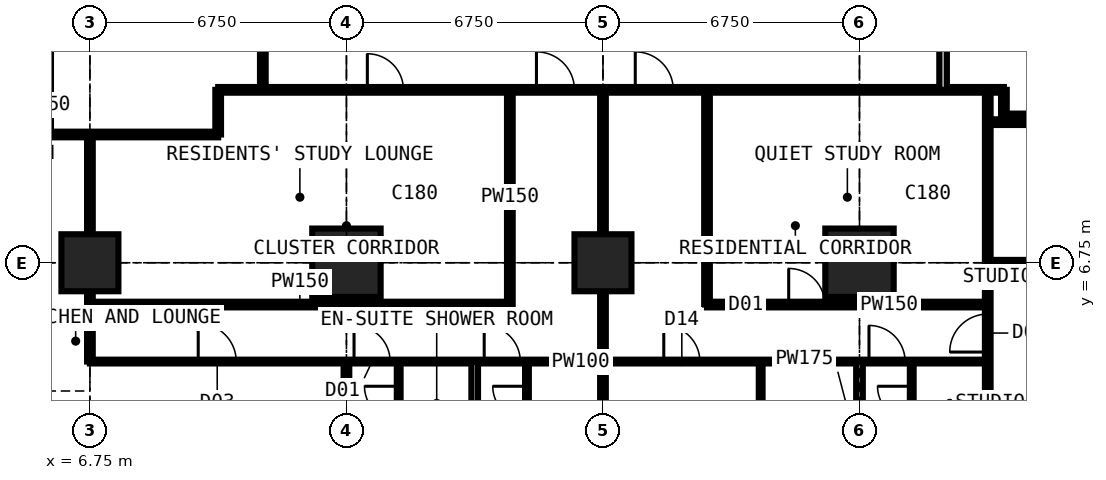
"""IFC4 building model, lengths in metres.
Left out: names, types, materials, properties, quantities, classifications, styles, units other than length and angle.
Written with IfcOpenShell. Run it as: python <this file> out.ifc"""

import sys

from ifc_helpers import new_model, si_unit, direction, frame, frame_2d, origin, origin_2d, place, context, subcontext, project, spatial, rectangle, extrude, element, fill, save


model = new_model("IFC4")
c1 = context("Model", 3, precision=1e-05, world=origin(), true_north=direction((0.0, 1.0)))
c2 = subcontext(c1, "Body", "Model", "MODEL_VIEW")
j1 = project(units=[si_unit("LENGTHUNIT", "METRE"), si_unit("PLANEANGLEUNIT", "RADIAN")], contexts=[c1])
p1 = place(None, origin())
s1 = spatial("IfcSite", under=j1, at=p1, CompositionType="ELEMENT")
p2 = place(p1, origin())
s2 = spatial("IfcBuilding", under=s1, at=p2, CompositionType="ELEMENT")
p3 = place(p2, frame((0.0, 0.0, 134.1)))
s3 = spatial("IfcBuildingStorey", under=s2, at=p3, CompositionType="ELEMENT", Elevation=134.1)
p4 = place(p3, frame((6.75, 6.75, 0.0), z_axis=(0.0, 0.0, 1.0), x_axis=(1.0, 0.0, 0.0)))
e1 = element("IfcColumn", 1, at=p4, inside=s3, PredefinedType="COLUMN", context=c2, shape_type="SweptSolid", body=[
    extrude(rectangle(XDim=1.5, YDim=1.5, at=origin_2d()), origin(), (0.0, 0.0, 1.0), 3.6),
])
p5 = place(p3, frame((13.5, 6.75, 0.0), z_axis=(0.0, 0.0, 1.0), x_axis=(1.0, 0.0, 0.0)))
e2 = element("IfcColumn", 2, at=p5, inside=s3, PredefinedType="COLUMN", context=c2, shape_type="SweptSolid", body=[
    extrude(rectangle(XDim=1.8, YDim=1.8, at=origin_2d()), origin(), (0.0, 0.0, 1.0), 3.6),
])
p6 = place(p3, frame((20.25, 6.75, 0.0), z_axis=(0.0, 0.0, 1.0), x_axis=(1.0, 0.0, 0.0)))
e3 = element("IfcColumn", 3, at=p6, inside=s3, PredefinedType="COLUMN", context=c2, shape_type="SweptSolid", body=[
    extrude(rectangle(XDim=1.5, YDim=1.5, at=origin_2d()), origin(), (0.0, 0.0, 1.0), 3.6),
])
p7 = place(p3, frame((27.0, 6.75, 0.0), z_axis=(0.0, 0.0, 1.0), x_axis=(1.0, 0.0, 0.0)))
e4 = element("IfcColumn", 4, at=p7, inside=s3, PredefinedType="COLUMN", context=c2, shape_type="SweptSolid", body=[
    extrude(rectangle(XDim=1.8, YDim=1.8, at=origin_2d()), origin(), (0.0, 0.0, 1.0), 3.6),
])
p8 = place(p3, frame((-0.734, 10.125, 0.0), z_axis=(0.0, 0.0, 1.0), x_axis=(1.0, 0.0, 0.0)))
e5 = element("IfcWall", 5, at=p8, inside=s3, PredefinedType="PARTITIONING", context=c2, shape_type="SweptSolid", body=[
    extrude(rectangle(XDim=10.859, YDim=0.15, at=frame_2d((5.429, 0.0))), origin(), (0.0, 0.0, 1.0), 3.3),
])
p9 = place(p3, frame((6.75, 4.15, 0.0), z_axis=(0.0, 0.0, 1.0), x_axis=(0.0, 1.0, 0.0)))
e6 = element("IfcWall", 6, at=p9, inside=s3, PredefinedType="PARTITIONING", context=c2, shape_type="SweptSolid", body=[
    extrude(rectangle(XDim=5.975, YDim=0.15, at=frame_2d((2.988, 0.0))), origin(), (0.0, 0.0, 1.0), 2.802),
])
p10 = place(p3, frame((6.75, 4.15, 0.0), z_axis=(0.0, 0.0, 1.0), x_axis=(1.0, 0.0, 0.0)))
e7 = element("IfcWall", 7, at=p10, inside=s3, PredefinedType="PARTITIONING", context=c2, shape_type="SweptSolid", body=[
    extrude(rectangle(XDim=23.625, YDim=0.1, at=frame_2d((11.812, 0.0))), origin(), (0.0, 0.0, 1.0), 3.3),
])
p11 = place(p10, frame((2.85, 0.0, 0.0)))
e8 = element("IfcOpeningElement", 8, at=p11, cuts=e7, PredefinedType="OPENING", context=c2, shape_type="SweptSolid", body=[
    extrude(rectangle(XDim=1.0, YDim=2.2, at=frame_2d((0.5, 1.1))), frame((0.0, 0.06, 0.0), z_axis=(0.0, -1.0, 0.0), x_axis=(1.0, 0.0, 0.0)), (0.0, 0.0, 1.0), 0.12),
])
p12 = place(p10, frame((6.95, 0.0, 0.0)))
e9 = element("IfcOpeningElement", 9, at=p12, cuts=e7, PredefinedType="OPENING", context=c2, shape_type="SweptSolid", body=[
    extrude(rectangle(XDim=0.95, YDim=2.2, at=frame_2d((0.475, 1.1))), frame((0.0, 0.06, 0.0), z_axis=(0.0, -1.0, 0.0), x_axis=(1.0, 0.0, 0.0)), (0.0, 0.0, 1.0), 0.12),
])
p13 = place(p10, frame((10.375, 0.0, 0.0)))
e10 = element("IfcOpeningElement", 10, at=p13, cuts=e7, PredefinedType="OPENING", context=c2, shape_type="SweptSolid", body=[
    extrude(rectangle(XDim=0.95, YDim=2.2, at=frame_2d((0.475, 1.1))), frame((0.0, 0.06, 0.0), z_axis=(0.0, -1.0, 0.0), x_axis=(1.0, 0.0, 0.0)), (0.0, 0.0, 1.0), 0.12),
])
p14 = place(p10, frame((15.1, 0.0, 0.0)))
e11 = element("IfcOpeningElement", 11, at=p14, cuts=e7, PredefinedType="OPENING", context=c2, shape_type="SweptSolid", body=[
    extrude(rectangle(XDim=0.95, YDim=2.2, at=frame_2d((0.475, 1.1))), frame((0.0, 0.06, 0.0), z_axis=(0.0, -1.0, 0.0), x_axis=(1.0, 0.0, 0.0)), (0.0, 0.0, 1.0), 0.12),
])
p15 = place(p10, frame((20.5, 0.0, 0.0)))
e12 = element("IfcOpeningElement", 12, at=p15, cuts=e7, PredefinedType="OPENING", context=c2, shape_type="SweptSolid", body=[
    extrude(rectangle(XDim=0.95, YDim=2.2, at=frame_2d((0.475, 1.1))), frame((0.0, 0.06, 0.0), z_axis=(0.0, -1.0, 0.0), x_axis=(1.0, 0.0, 0.0)), (0.0, 0.0, 1.0), 0.12),
])
p16 = place(p3, frame((6.75, 5.65, 0.0), z_axis=(0.0, 0.0, 1.0), x_axis=(1.0, 0.0, 0.0)))
e13 = element("IfcWall", 13, at=p16, inside=s3, PredefinedType="PARTITIONING", context=c2, shape_type="SweptSolid", body=[
    extrude(rectangle(XDim=11.05, YDim=0.15, at=frame_2d((5.525, 0.0))), origin(), (0.0, 0.0, 1.0), 3.3),
])
p17 = place(p3, frame((10.125, 10.125, 0.0), z_axis=(0.0, 0.0, 1.0), x_axis=(0.0, 1.0, 0.0)))
e14 = element("IfcWall", 14, at=p17, inside=s3, PredefinedType="PARTITIONING", context=c2, shape_type="SweptSolid", body=[
    extrude(rectangle(XDim=1.175, YDim=0.15, at=frame_2d((0.587, 0.0))), origin(), (0.0, 0.0, 1.0), 3.3),
])
p18 = place(p3, frame((10.125, 11.3, 0.0), z_axis=(0.0, 0.0, 1.0), x_axis=(1.0, 0.0, 0.0)))
e15 = element("IfcWall", 15, at=p18, inside=s3, PredefinedType="PARTITIONING", context=c2, shape_type="SweptSolid", body=[
    extrude(rectangle(XDim=20.675, YDim=0.15, at=frame_2d((10.337, 0.0))), origin(), (0.0, 0.0, 1.0), 3.3),
])
p19 = place(p18, frame((8.375, 0.0, 0.0)))
e16 = element("IfcOpeningElement", 16, at=p19, cuts=e15, PredefinedType="OPENING", context=c2, shape_type="SweptSolid", body=[
    extrude(rectangle(XDim=1.0, YDim=2.2, at=frame_2d((0.5, 1.1))), frame((0.0, 0.085, 0.0), z_axis=(0.0, -1.0, 0.0), x_axis=(1.0, 0.0, 0.0)), (0.0, 0.0, 1.0), 0.17),
])
p20 = place(p18, frame((10.975, 0.0, 0.0)))
e17 = element("IfcOpeningElement", 17, at=p20, cuts=e15, PredefinedType="OPENING", context=c2, shape_type="SweptSolid", body=[
    extrude(rectangle(XDim=1.0, YDim=2.2, at=frame_2d((0.5, 1.1))), frame((0.0, 0.085, 0.0), z_axis=(0.0, -1.0, 0.0), x_axis=(1.0, 0.0, 0.0)), (0.0, 0.0, 1.0), 0.17),
])
p21 = place(p18, frame((3.925, 0.0, 0.0)))
e18 = element("IfcOpeningElement", 18, at=p21, cuts=e15, PredefinedType="OPENING", context=c2, shape_type="SweptSolid", body=[
    extrude(rectangle(XDim=0.95, YDim=2.2, at=frame_2d((0.475, 1.1))), frame((0.0, 0.085, 0.0), z_axis=(0.0, -1.0, 0.0), x_axis=(1.0, 0.0, 0.0)), (0.0, 0.0, 1.0), 0.17),
])
p22 = place(p3, frame((11.3, 11.3, 0.0), z_axis=(0.0, 0.0, 1.0), x_axis=(0.0, 1.0, 0.0)))
e19 = element("IfcWall", 19, at=p22, inside=s3, PredefinedType="PARTITIONING", context=c2, shape_type="SweptSolid", body=[
    extrude(rectangle(XDim=19.3, YDim=0.15, at=frame_2d((9.65, 0.0))), origin(), (0.0, 0.0, 1.0), 3.3),
])
p23 = place(p22, frame((13.525, 0.0, 0.0)))
e20 = element("IfcOpeningElement", 20, at=p23, cuts=e19, PredefinedType="OPENING", context=c2, shape_type="SweptSolid", body=[
    extrude(rectangle(XDim=1.0, YDim=2.2, at=frame_2d((0.5, 1.1))), frame((0.0, 0.085, 0.0), z_axis=(0.0, -1.0, 0.0), x_axis=(1.0, 0.0, 0.0)), (0.0, 0.0, 1.0), 0.17),
])
p24 = place(p22, frame((10.438, 0.0, 0.0)))
e21 = element("IfcOpeningElement", 21, at=p24, cuts=e19, PredefinedType="OPENING", context=c2, shape_type="SweptSolid", body=[
    extrude(rectangle(XDim=1.0, YDim=2.2, at=frame_2d((0.5, 1.1))), frame((0.0, 0.085, 0.0), z_axis=(0.0, -1.0, 0.0), x_axis=(1.0, 0.0, 0.0)), (0.0, 0.0, 1.0), 0.17),
])
p25 = place(p3, frame((13.5, -0.734, 0.0), z_axis=(0.0, 0.0, 1.0), x_axis=(0.0, 1.0, 0.0)))
e22 = element("IfcWall", 22, at=p25, inside=s3, PredefinedType="PARTITIONING", context=c2, shape_type="SweptSolid", body=[
    extrude(rectangle(XDim=4.884, YDim=0.15, at=frame_2d((2.442, 0.0))), origin(), (0.0, 0.0, 1.0), 2.802),
])
p26 = place(p3, frame((14.875, 1.95, 0.0), z_axis=(0.0, 0.0, 1.0), x_axis=(0.0, 1.0, 0.0)))
e23 = element("IfcWall", 23, at=p26, inside=s3, PredefinedType="PARTITIONING", context=c2, shape_type="SweptSolid", body=[
    extrude(rectangle(XDim=2.2, YDim=0.1, at=frame_2d((1.1, 0.0))), origin(), (0.0, 0.0, 1.0), 3.3),
])
p27 = place(p26, frame((0.65, 0.0, 0.0)))
e24 = element("IfcOpeningElement", 24, at=p27, cuts=e23, PredefinedType="OPENING", context=c2, shape_type="SweptSolid", body=[
    extrude(rectangle(XDim=0.9, YDim=2.2, at=frame_2d((0.45, 1.1))), frame((0.0, 0.06, 0.0), z_axis=(0.0, -1.0, 0.0), x_axis=(1.0, 0.0, 0.0)), (0.0, 0.0, 1.0), 0.12),
])
p28 = place(p3, frame((16.875, -0.734, 0.0), z_axis=(0.0, 0.0, 1.0), x_axis=(0.0, 1.0, 0.0)))
e25 = element("IfcWall", 25, at=p28, inside=s3, PredefinedType="PARTITIONING", context=c2, shape_type="SweptSolid", body=[
    extrude(rectangle(XDim=4.884, YDim=0.175, at=frame_2d((2.442, 0.0))), origin(), (0.0, 0.0, 1.0), 3.3),
])
p29 = place(p3, frame((17.8, 5.65, 0.0), z_axis=(0.0, 0.0, 1.0), x_axis=(0.0, 1.0, 0.0)))
e26 = element("IfcWall", 26, at=p29, inside=s3, PredefinedType="PARTITIONING", context=c2, shape_type="SweptSolid", body=[
    extrude(rectangle(XDim=5.65, YDim=0.15, at=frame_2d((2.825, 0.0))), origin(), (0.0, 0.0, 1.0), 3.3),
])
p30 = place(p3, frame((18.25, 1.95, 0.0), z_axis=(0.0, 0.0, 1.0), x_axis=(0.0, 1.0, 0.0)))
e27 = element("IfcWall", 27, at=p30, inside=s3, PredefinedType="PARTITIONING", context=c2, shape_type="SweptSolid", body=[
    extrude(rectangle(XDim=2.2, YDim=0.1, at=frame_2d((1.1, 0.0))), origin(), (0.0, 0.0, 1.0), 3.3),
])
p31 = place(p30, frame((0.65, 0.0, 0.0)))
e28 = element("IfcOpeningElement", 28, at=p31, cuts=e27, PredefinedType="OPENING", context=c2, shape_type="SweptSolid", body=[
    extrude(rectangle(XDim=0.9, YDim=2.2, at=frame_2d((0.45, 1.1))), frame((0.0, 0.06, 0.0), z_axis=(0.0, -1.0, 0.0), x_axis=(1.0, 0.0, 0.0)), (0.0, 0.0, 1.0), 0.12),
])
p32 = place(p3, frame((20.25, -0.734, 0.0), z_axis=(0.0, 0.0, 1.0), x_axis=(0.0, 1.0, 0.0)))
e29 = element("IfcWall", 29, at=p32, inside=s3, PredefinedType="PARTITIONING", context=c2, shape_type="SweptSolid", body=[
    extrude(rectangle(XDim=12.034, YDim=0.15, at=frame_2d((6.017, 0.0))), origin(), (0.0, 0.0, 1.0), 2.802),
])
p33 = place(p3, frame((22.988, 5.65, 0.0), z_axis=(0.0, 0.0, 1.0), x_axis=(1.0, 0.0, 0.0)))
e30 = element("IfcWall", 30, at=p33, inside=s3, PredefinedType="PARTITIONING", context=c2, shape_type="SweptSolid", body=[
    extrude(rectangle(XDim=7.387, YDim=0.15, at=frame_2d((3.694, 0.0))), origin(), (0.0, 0.0, 1.0), 3.3),
])
p34 = place(p33, frame((2.15, 0.0, 0.0)))
e31 = element("IfcOpeningElement", 31, at=p34, cuts=e30, PredefinedType="OPENING", context=c2, shape_type="SweptSolid", body=[
    extrude(rectangle(XDim=0.95, YDim=2.2, at=frame_2d((0.475, 1.1))), frame((0.0, 0.085, 0.0), z_axis=(0.0, -1.0, 0.0), x_axis=(1.0, 0.0, 0.0)), (0.0, 0.0, 1.0), 0.17),
])
p35 = place(p3, frame((22.988, 5.65, 0.0), z_axis=(0.0, 0.0, 1.0), x_axis=(0.0, 1.0, 0.0)))
e32 = element("IfcWall", 32, at=p35, inside=s3, PredefinedType="PARTITIONING", context=c2, shape_type="SweptSolid", body=[
    extrude(rectangle(XDim=5.65, YDim=0.15, at=frame_2d((2.825, 0.0))), origin(), (0.0, 0.0, 1.0), 3.3),
])
p36 = place(p3, frame((24.4, 1.75, 0.0), z_axis=(0.0, 0.0, 1.0), x_axis=(0.0, 1.0, 0.0)))
e33 = element("IfcWall", 33, at=p36, inside=s3, PredefinedType="PARTITIONING", context=c2, shape_type="SweptSolid", body=[
    extrude(rectangle(XDim=2.4, YDim=0.1, at=frame_2d((1.2, 0.0))), origin(), (0.0, 0.0, 1.0), 3.3),
])
p37 = place(p3, frame((27.0, -0.734, 0.0), z_axis=(0.0, 0.0, 1.0), x_axis=(0.0, 1.0, 0.0)))
e34 = element("IfcWall", 34, at=p37, inside=s3, PredefinedType="PARTITIONING", context=c2, shape_type="SweptSolid", body=[
    extrude(rectangle(XDim=4.884, YDim=0.175, at=frame_2d((2.442, 0.0))), origin(), (0.0, 0.0, 1.0), 2.802),
])
p38 = place(p3, frame((28.375, 1.95, 0.0), z_axis=(0.0, 0.0, 1.0), x_axis=(0.0, 1.0, 0.0)))
e35 = element("IfcWall", 35, at=p38, inside=s3, PredefinedType="PARTITIONING", context=c2, shape_type="SweptSolid", body=[
    extrude(rectangle(XDim=2.2, YDim=0.1, at=frame_2d((1.1, 0.0))), origin(), (0.0, 0.0, 1.0), 3.3),
])
p39 = place(p38, frame((0.65, 0.0, 0.0)))
e36 = element("IfcOpeningElement", 36, at=p39, cuts=e35, PredefinedType="OPENING", context=c2, shape_type="SweptSolid", body=[
    extrude(rectangle(XDim=0.9, YDim=2.2, at=frame_2d((0.45, 1.1))), frame((0.0, 0.06, 0.0), z_axis=(0.0, -1.0, 0.0), x_axis=(1.0, 0.0, 0.0)), (0.0, 0.0, 1.0), 0.12),
])
p40 = place(p3, frame((29.2, 11.3, 0.0), z_axis=(0.0, 0.0, 1.0), x_axis=(0.0, 1.0, 0.0)))
e37 = element("IfcWall", 37, at=p40, inside=s3, PredefinedType="PARTITIONING", context=c2, shape_type="SweptSolid", body=[
    extrude(rectangle(XDim=17.9, YDim=0.2, at=frame_2d((8.95, 0.0))), origin(), (0.0, 0.0, 1.0), 3.3),
])
p41 = place(p40, frame((8.35, 0.0, 0.0)))
e38 = element("IfcOpeningElement", 38, at=p41, cuts=e37, PredefinedType="OPENING", context=c2, shape_type="SweptSolid", body=[
    extrude(rectangle(XDim=1.2, YDim=2.2, at=frame_2d((0.6, 1.1))), frame((0.0, 0.11, 0.0), z_axis=(0.0, -1.0, 0.0), x_axis=(1.0, 0.0, 0.0)), (0.0, 0.0, 1.0), 0.22),
])
p42 = place(p3, frame((30.375, -0.734, 0.0), z_axis=(0.0, 0.0, 1.0), x_axis=(0.0, 1.0, 0.0)))
e39 = element("IfcWall", 39, at=p42, inside=s3, PredefinedType="PARTITIONING", context=c2, shape_type="SweptSolid", body=[
    extrude(rectangle(XDim=12.034, YDim=0.15, at=frame_2d((6.017, 0.0))), origin(), (0.0, 0.0, 1.0), 3.3),
])
p43 = place(p42, frame((5.134, 0.0, 0.0)))
e40 = element("IfcOpeningElement", 40, at=p43, cuts=e39, PredefinedType="OPENING", context=c2, shape_type="SweptSolid", body=[
    extrude(rectangle(XDim=1.0, YDim=2.2, at=frame_2d((0.5, 1.1))), frame((0.0, 0.085, 0.0), z_axis=(0.0, -1.0, 0.0), x_axis=(1.0, 0.0, 0.0)), (0.0, 0.0, 1.0), 0.17),
])
p44 = place(p3, frame((30.375, 6.75, 0.0), z_axis=(0.0, 0.0, 1.0), x_axis=(1.0, 0.0, 0.0)))
e41 = element("IfcWall", 41, at=p44, inside=s3, PredefinedType="PARTITIONING", context=c2, shape_type="SweptSolid", body=[
    extrude(rectangle(XDim=5.975, YDim=0.15, at=frame_2d((2.988, 0.0))), origin(), (0.0, 0.0, 1.0), 2.802),
])
p45 = place(p3, frame((30.375, 10.45, 0.0), z_axis=(0.0, 0.0, 1.0), x_axis=(1.0, 0.0, 0.0)))
e42 = element("IfcWall", 42, at=p45, inside=s3, PredefinedType="PARTITIONING", context=c2, shape_type="SweptSolid", body=[
    extrude(rectangle(XDim=4.475, YDim=0.15, at=frame_2d((2.238, 0.0))), origin(), (0.0, 0.0, 1.0), 3.3),
])
p46 = place(p45, frame((2.35, 0.0, 0.0)))
e43 = element("IfcOpeningElement", 43, at=p46, cuts=e42, PredefinedType="OPENING", context=c2, shape_type="SweptSolid", body=[
    extrude(rectangle(XDim=0.95, YDim=2.2, at=frame_2d((0.475, 1.1))), frame((0.0, 0.085, 0.0), z_axis=(0.0, -1.0, 0.0), x_axis=(1.0, 0.0, 0.0)), (0.0, 0.0, 1.0), 0.17),
])
p47 = place(p3, frame((30.8, 10.6, 0.0), z_axis=(0.0, 0.0, 1.0), x_axis=(0.0, 1.0, 0.0)))
e44 = element("IfcWall", 44, at=p47, inside=s3, PredefinedType="PARTITIONING", context=c2, shape_type="SweptSolid", body=[
    extrude(rectangle(XDim=0.7, YDim=0.15, at=frame_2d((0.35, 0.0))), origin(), (0.0, 0.0, 1.0), 3.3),
])
p48 = place(p3, frame((30.8, 10.6, 0.0), z_axis=(0.0, 0.0, 1.0), x_axis=(1.0, 0.0, 0.0)))
e45 = element("IfcWall", 45, at=p48, inside=s3, PredefinedType="PARTITIONING", context=c2, shape_type="SweptSolid", body=[
    extrude(rectangle(XDim=1.85, YDim=0.15, at=frame_2d((0.925, 0.0))), origin(), (0.0, 0.0, 1.0), 3.3),
])
p49 = place(p11, origin())
e46 = element("IfcDoor", 46, at=p49, inside=s3, OperationType="SINGLE_SWING_LEFT", PredefinedType="DOOR", context=c2, shape_type="SweptSolid", body=[
    extrude(rectangle(XDim=1.0, YDim=2.2, at=frame_2d((0.5, 1.1))), frame((0.0, 0.025, 0.0), z_axis=(0.0, -1.0, 0.0), x_axis=(1.0, 0.0, 0.0)), (0.0, 0.0, 1.0), 0.05),
])
fill(e8, e46)
p50 = place(p12, origin())
e47 = element("IfcDoor", 47, at=p50, inside=s3, OperationType="SINGLE_SWING_LEFT", PredefinedType="DOOR", context=c2, shape_type="SweptSolid", body=[
    extrude(rectangle(XDim=0.95, YDim=2.2, at=frame_2d((0.475, 1.1))), frame((0.0, 0.025, 0.0), z_axis=(0.0, -1.0, 0.0), x_axis=(1.0, 0.0, 0.0)), (0.0, 0.0, 1.0), 0.05),
])
fill(e9, e47)
p51 = place(p27, origin())
e48 = element("IfcDoor", 48, at=p51, inside=s3, OperationType="SINGLE_SWING_RIGHT", PredefinedType="DOOR", context=c2, shape_type="SweptSolid", body=[
    extrude(rectangle(XDim=0.9, YDim=2.2, at=frame_2d((0.45, 1.1))), frame((0.0, 0.025, 0.0), z_axis=(0.0, -1.0, 0.0), x_axis=(1.0, 0.0, 0.0)), (0.0, 0.0, 1.0), 0.05),
])
fill(e24, e48)
p52 = place(p13, origin())
e49 = element("IfcDoor", 49, at=p52, inside=s3, OperationType="SINGLE_SWING_LEFT", PredefinedType="DOOR", context=c2, shape_type="SweptSolid", body=[
    extrude(rectangle(XDim=0.95, YDim=2.2, at=frame_2d((0.475, 1.1))), frame((0.0, 0.025, 0.0), z_axis=(0.0, -1.0, 0.0), x_axis=(1.0, 0.0, 0.0)), (0.0, 0.0, 1.0), 0.05),
])
fill(e10, e49)
p53 = place(p31, origin())
e50 = element("IfcDoor", 50, at=p53, inside=s3, OperationType="SINGLE_SWING_RIGHT", PredefinedType="DOOR", context=c2, shape_type="SweptSolid", body=[
    extrude(rectangle(XDim=0.9, YDim=2.2, at=frame_2d((0.45, 1.1))), frame((0.0, 0.025, 0.0), z_axis=(0.0, -1.0, 0.0), x_axis=(1.0, 0.0, 0.0)), (0.0, 0.0, 1.0), 0.05),
])
fill(e28, e50)
p54 = place(p19, origin())
e51 = element("IfcDoor", 51, at=p54, inside=s3, OperationType="SINGLE_SWING_LEFT", PredefinedType="DOOR", context=c2, shape_type="SweptSolid", body=[
    extrude(rectangle(XDim=1.0, YDim=2.2, at=frame_2d((0.5, 1.1))), frame((0.0, 0.025, 0.0), z_axis=(0.0, -1.0, 0.0), x_axis=(1.0, 0.0, 0.0)), (0.0, 0.0, 1.0), 0.05),
])
fill(e16, e51)
p55 = place(p14, origin())
e52 = element("IfcDoor", 52, at=p55, inside=s3, OperationType="SINGLE_SWING_LEFT", PredefinedType="DOOR", context=c2, shape_type="SweptSolid", body=[
    extrude(rectangle(XDim=0.95, YDim=2.2, at=frame_2d((0.475, 1.1))), frame((0.0, 0.025, 0.0), z_axis=(0.0, -1.0, 0.0), x_axis=(1.0, 0.0, 0.0)), (0.0, 0.0, 1.0), 0.05),
])
fill(e11, e52)
p56 = place(p15, origin())
e53 = element("IfcDoor", 53, at=p56, inside=s3, OperationType="SINGLE_SWING_LEFT", PredefinedType="DOOR", context=c2, shape_type="SweptSolid", body=[
    extrude(rectangle(XDim=0.95, YDim=2.2, at=frame_2d((0.475, 1.1))), frame((0.0, 0.025, 0.0), z_axis=(0.0, -1.0, 0.0), x_axis=(1.0, 0.0, 0.0)), (0.0, 0.0, 1.0), 0.05),
])
fill(e12, e53)
p57 = place(p39, origin())
e54 = element("IfcDoor", 54, at=p57, inside=s3, OperationType="SINGLE_SWING_RIGHT", PredefinedType="DOOR", context=c2, shape_type="SweptSolid", body=[
    extrude(rectangle(XDim=0.9, YDim=2.2, at=frame_2d((0.45, 1.1))), frame((0.0, 0.025, 0.0), z_axis=(0.0, -1.0, 0.0), x_axis=(1.0, 0.0, 0.0)), (0.0, 0.0, 1.0), 0.05),
])
fill(e36, e54)
p58 = place(p20, origin())
e55 = element("IfcDoor", 55, at=p58, inside=s3, OperationType="SINGLE_SWING_LEFT", PredefinedType="DOOR", context=c2, shape_type="SweptSolid", body=[
    extrude(rectangle(XDim=1.0, YDim=2.2, at=frame_2d((0.5, 1.1))), frame((0.0, 0.025, 0.0), z_axis=(0.0, -1.0, 0.0), x_axis=(1.0, 0.0, 0.0)), (0.0, 0.0, 1.0), 0.05),
])
fill(e17, e55)
p59 = place(p21, origin())
e56 = element("IfcDoor", 56, at=p59, inside=s3, OperationType="SINGLE_SWING_LEFT", PredefinedType="DOOR", context=c2, shape_type="SweptSolid", body=[
    extrude(rectangle(XDim=0.95, YDim=2.2, at=frame_2d((0.475, 1.1))), frame((0.0, 0.025, 0.0), z_axis=(0.0, -1.0, 0.0), x_axis=(1.0, 0.0, 0.0)), (0.0, 0.0, 1.0), 0.05),
])
fill(e18, e56)
p60 = place(p34, origin())
e57 = element("IfcDoor", 57, at=p60, inside=s3, OperationType="SINGLE_SWING_LEFT", PredefinedType="DOOR", context=c2, shape_type="SweptSolid", body=[
    extrude(rectangle(XDim=0.95, YDim=2.2, at=frame_2d((0.475, 1.1))), frame((0.0, 0.025, 0.0), z_axis=(0.0, -1.0, 0.0), x_axis=(1.0, 0.0, 0.0)), (0.0, 0.0, 1.0), 0.05),
])
fill(e31, e57)
p61 = place(p43, origin())
e58 = element("IfcDoor", 58, at=p61, inside=s3, OperationType="SINGLE_SWING_LEFT", PredefinedType="DOOR", context=c2, shape_type="SweptSolid", body=[
    extrude(rectangle(XDim=1.0, YDim=2.2, at=frame_2d((0.5, 1.1))), frame((0.0, 0.025, 0.0), z_axis=(0.0, -1.0, 0.0), x_axis=(1.0, 0.0, 0.0)), (0.0, 0.0, 1.0), 0.05),
])
fill(e40, e58)
save(model, sys.argv[1])
